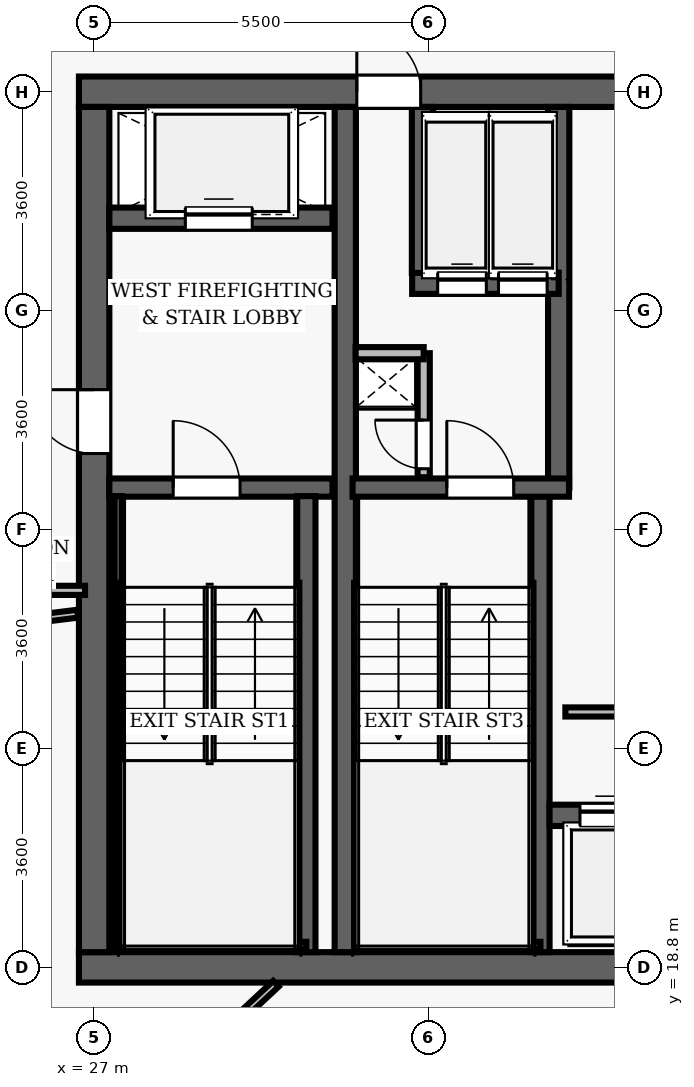
"""IFC4 building model, lengths in metres.
Left out: names, types, materials, properties, quantities, classifications, styles, units other than length and angle.
Written with IfcOpenShell. Run it as: python <this file> out.ifc"""

import sys

from ifc_helpers import new_model, si_unit, direction, frame, frame_2d, origin, place, context, subcontext, project, spatial, rectangle, extrude, element, fill, save


model = new_model("IFC4")
c1 = context("Model", 3, precision=1e-05, world=origin(), true_north=direction((0.0, 1.0)))
c2 = subcontext(c1, "Body", "Model", "MODEL_VIEW")
j1 = project(units=[si_unit("LENGTHUNIT", "METRE"), si_unit("PLANEANGLEUNIT", "RADIAN")], contexts=[c1])
p1 = place(None, origin())
s1 = spatial("IfcSite", under=j1, at=p1, CompositionType="ELEMENT")
p2 = place(p1, origin())
s2 = spatial("IfcBuilding", under=s1, at=p2, CompositionType="ELEMENT")
p3 = place(p2, frame((0.0, 0.0, 209.7)))
s3 = spatial("IfcBuildingStorey", under=s2, at=p3, CompositionType="ELEMENT", Elevation=209.7)
p4 = place(p3, frame((26.75, 18.8, 0.0), z_axis=(0.0, 0.0, 1.0), x_axis=(1.0, 0.0, 0.0)))
e1 = element("IfcWall", 1, at=p4, inside=s3, PredefinedType="SHEAR", context=c2, shape_type="SweptSolid", body=[
    extrude(rectangle(XDim=22.5, YDim=0.5, at=frame_2d((11.25, 0.0))), origin(), (0.0, 0.0, 1.0), 3.85),
])
p5 = place(p4, frame((14.47, 0.0, 0.0)))
e2 = element("IfcOpeningElement", 2, at=p5, cuts=e1, PredefinedType="OPENING", context=c2, shape_type="SweptSolid", body=[
    extrude(rectangle(XDim=1.05, YDim=2.15, at=frame_2d((0.525, 1.075))), frame((0.0, 0.26, 0.0), z_axis=(0.0, -1.0, 0.0), x_axis=(1.0, 0.0, 0.0)), (0.0, 0.0, 1.0), 0.52),
])
p6 = place(p3, frame((26.75, 33.2, 0.0), z_axis=(0.0, 0.0, 1.0), x_axis=(1.0, 0.0, 0.0)))
e3 = element("IfcWall", 3, at=p6, inside=s3, PredefinedType="SHEAR", context=c2, shape_type="SweptSolid", body=[
    extrude(rectangle(XDim=22.5, YDim=0.5, at=frame_2d((11.25, 0.0))), origin(), (0.0, 0.0, 1.0), 3.85),
])
p7 = place(p6, frame((4.57, 0.0, 0.0)))
e4 = element("IfcOpeningElement", 4, at=p7, cuts=e3, PredefinedType="OPENING", context=c2, shape_type="SweptSolid", body=[
    extrude(rectangle(XDim=1.05, YDim=2.15, at=frame_2d((0.525, 1.075))), frame((0.0, 0.26, 0.0), z_axis=(0.0, -1.0, 0.0), x_axis=(1.0, 0.0, 0.0)), (0.0, 0.0, 1.0), 0.52),
])
p8 = place(p6, frame((14.47, 0.0, 0.0)))
e5 = element("IfcOpeningElement", 5, at=p8, cuts=e3, PredefinedType="OPENING", context=c2, shape_type="SweptSolid", body=[
    extrude(rectangle(XDim=1.05, YDim=2.15, at=frame_2d((0.525, 1.075))), frame((0.0, 0.26, 0.0), z_axis=(0.0, -1.0, 0.0), x_axis=(1.0, 0.0, 0.0)), (0.0, 0.0, 1.0), 0.52),
])
p9 = place(p3, frame((27.0, 19.05, 0.0), z_axis=(0.0, 0.0, 1.0), x_axis=(0.0, 1.0, 0.0)))
e6 = element("IfcWall", 6, at=p9, inside=s3, PredefinedType="SHEAR", context=c2, shape_type="SweptSolid", body=[
    extrude(rectangle(XDim=13.9, YDim=0.5, at=frame_2d((6.95, 0.0))), origin(), (0.0, 0.0, 1.0), 3.85),
])
p10 = place(p9, frame((8.2, 0.0, 0.0)))
e7 = element("IfcOpeningElement", 7, at=p10, cuts=e6, PredefinedType="OPENING", context=c2, shape_type="SweptSolid", body=[
    extrude(rectangle(XDim=1.05, YDim=2.15, at=frame_2d((0.525, 1.075))), frame((0.0, 0.26, 0.0), z_axis=(0.0, -1.0, 0.0), x_axis=(1.0, 0.0, 0.0)), (0.0, 0.0, 1.0), 0.52),
])
p11 = place(p3, frame((31.13, 19.05, 0.0), z_axis=(0.0, 0.0, 1.0), x_axis=(0.0, 1.0, 0.0)))
e8 = element("IfcWall", 8, at=p11, inside=s3, PredefinedType="SHEAR", context=c2, shape_type="SweptSolid", body=[
    extrude(rectangle(XDim=13.9, YDim=0.35, at=frame_2d((6.95, 0.0))), origin(), (0.0, 0.0, 1.0), 3.85),
])
p12 = place(p3, frame((27.25, 26.69, 0.0), z_axis=(0.0, 0.0, 1.0), x_axis=(1.0, 0.0, 0.0)))
e9 = element("IfcWall", 9, at=p12, inside=s3, PredefinedType="SHEAR", context=c2, shape_type="SweptSolid", body=[
    extrude(rectangle(XDim=3.67, YDim=0.3, at=frame_2d((1.835, 0.0))), origin(), (0.0, 0.0, 1.0), 3.85),
])
p13 = place(p12, frame((1.05, 0.0, 0.0)))
e10 = element("IfcOpeningElement", 10, at=p13, cuts=e9, PredefinedType="OPENING", context=c2, shape_type="SweptSolid", body=[
    extrude(rectangle(XDim=1.1, YDim=2.15, at=frame_2d((0.55, 1.075))), frame((0.0, 0.16, 0.0), z_axis=(0.0, -1.0, 0.0), x_axis=(1.0, 0.0, 0.0)), (0.0, 0.0, 1.0), 0.32),
])
p14 = place(p3, frame((30.49, 19.05, 0.0), z_axis=(0.0, 0.0, 1.0), x_axis=(0.0, 1.0, 0.0)))
e11 = element("IfcWall", 11, at=p14, inside=s3, PredefinedType="SHEAR", context=c2, shape_type="SweptSolid", body=[
    extrude(rectangle(XDim=7.5, YDim=0.3, at=frame_2d((3.75, 0.0))), origin(), (0.0, 0.0, 1.0), 3.85),
])
p15 = place(p3, frame((27.395, 19.1, 0.0), z_axis=(0.0, 0.0, 1.0), x_axis=(0.0, 1.0, 0.0)))
e12 = element("IfcWall", 12, at=p15, inside=s3, PredefinedType="SHEAR", context=c2, shape_type="SweptSolid", body=[
    extrude(rectangle(XDim=7.45, YDim=0.12, at=frame_2d((3.725, 0.0))), origin(), (0.0, 0.0, 1.0), 3.85),
])
p16 = place(p3, frame((27.395, 19.16, 0.0), z_axis=(0.0, 0.0, 1.0), x_axis=(1.0, 0.0, 0.0)))
e13 = element("IfcWall", 13, at=p16, inside=s3, PredefinedType="SHEAR", context=c2, shape_type="SweptSolid", body=[
    extrude(rectangle(XDim=3.095, YDim=0.12, at=frame_2d((1.547, 0.0))), origin(), (0.0, 0.0, 1.0), 3.85),
])
p17 = place(p3, frame((27.25, 31.12, 0.0), z_axis=(0.0, 0.0, 1.0), x_axis=(1.0, 0.0, 0.0)))
e14 = element("IfcWall", 14, at=p17, inside=s3, PredefinedType="SHEAR", context=c2, shape_type="SweptSolid", body=[
    extrude(rectangle(XDim=3.67, YDim=0.35, at=frame_2d((1.835, 0.0))), origin(), (0.0, 0.0, 1.0), 3.035),
])
p18 = place(p17, frame((1.25, 0.0, 0.0)))
e15 = element("IfcOpeningElement", 15, at=p18, cuts=e14, PredefinedType="OPENING", context=c2, shape_type="SweptSolid", body=[
    extrude(rectangle(XDim=1.1, YDim=2.15, at=frame_2d((0.55, 1.075))), frame((0.0, 0.185, 0.0), z_axis=(0.0, -1.0, 0.0), x_axis=(1.0, 0.0, 0.0)), (0.0, 0.0, 1.0), 0.37),
])
p19 = place(p3, frame((34.34, 19.05, 0.0), z_axis=(0.0, 0.0, 1.0), x_axis=(0.0, 1.0, 0.0)))
e16 = element("IfcWall", 16, at=p19, inside=s3, PredefinedType="SHEAR", context=c2, shape_type="SweptSolid", body=[
    extrude(rectangle(XDim=7.5, YDim=0.3, at=frame_2d((3.75, 0.0))), origin(), (0.0, 0.0, 1.0), 3.85),
])
p20 = place(p3, frame((34.64, 26.69, 0.0), z_axis=(0.0, 0.0, 1.0), x_axis=(0.0, 1.0, 0.0)))
e17 = element("IfcWall", 17, at=p20, inside=s3, PredefinedType="SHEAR", context=c2, shape_type="SweptSolid", body=[
    extrude(rectangle(XDim=6.26, YDim=0.35, at=frame_2d((3.13, 0.0))), origin(), (0.0, 0.0, 1.0), 3.85),
])
p21 = place(p3, frame((31.25, 26.69, 0.0), z_axis=(0.0, 0.0, 1.0), x_axis=(1.0, 0.0, 0.0)))
e18 = element("IfcWall", 18, at=p21, inside=s3, PredefinedType="SHEAR", context=c2, shape_type="SweptSolid", body=[
    extrude(rectangle(XDim=3.56, YDim=0.3, at=frame_2d((1.78, 0.0))), origin(), (0.0, 0.0, 1.0), 3.85),
])
p22 = place(p21, frame((1.55, 0.0, 0.0)))
e19 = element("IfcOpeningElement", 19, at=p22, cuts=e18, PredefinedType="OPENING", context=c2, shape_type="SweptSolid", body=[
    extrude(rectangle(XDim=1.1, YDim=2.15, at=frame_2d((0.55, 1.075))), frame((0.0, 0.16, 0.0), z_axis=(0.0, -1.0, 0.0), x_axis=(1.0, 0.0, 0.0)), (0.0, 0.0, 1.0), 0.32),
])
p23 = place(p3, frame((31.3, 19.16, 0.0), z_axis=(0.0, 0.0, 1.0), x_axis=(1.0, 0.0, 0.0)))
e20 = element("IfcWall", 20, at=p23, inside=s3, PredefinedType="SHEAR", context=c2, shape_type="SweptSolid", body=[
    extrude(rectangle(XDim=3.04, YDim=0.12, at=frame_2d((1.52, 0.0))), origin(), (0.0, 0.0, 1.0), 3.85),
])
p24 = place(p3, frame((32.23, 30.05, 0.0), z_axis=(0.0, 0.0, 1.0), x_axis=(1.0, 0.0, 0.0)))
e21 = element("IfcWall", 21, at=p24, inside=s3, PredefinedType="SHEAR", context=c2, shape_type="SweptSolid", body=[
    extrude(rectangle(XDim=2.41, YDim=0.35, at=frame_2d((1.205, 0.0))), origin(), (0.0, 0.0, 1.0), 3.035),
])
p25 = place(p24, frame((0.42, 0.0, 0.0)))
e22 = element("IfcOpeningElement", 22, at=p25, cuts=e21, PredefinedType="OPENING", context=c2, shape_type="SweptSolid", body=[
    extrude(rectangle(XDim=0.8, YDim=2.15, at=frame_2d((0.4, 1.075))), frame((0.0, 0.185, 0.0), z_axis=(0.0, -1.0, 0.0), x_axis=(1.0, 0.0, 0.0)), (0.0, 0.0, 1.0), 0.37),
])
p26 = place(p24, frame((1.42, 0.0, 0.0)))
e23 = element("IfcOpeningElement", 23, at=p26, cuts=e21, PredefinedType="OPENING", context=c2, shape_type="SweptSolid", body=[
    extrude(rectangle(XDim=0.8, YDim=2.15, at=frame_2d((0.4, 1.075))), frame((0.0, 0.185, 0.0), z_axis=(0.0, -1.0, 0.0), x_axis=(1.0, 0.0, 0.0)), (0.0, 0.0, 1.0), 0.37),
])
p27 = place(p3, frame((32.4, 30.22, 0.0), z_axis=(0.0, 0.0, 1.0), x_axis=(0.0, 1.0, 0.0)))
e24 = element("IfcWall", 24, at=p27, inside=s3, PredefinedType="SHEAR", context=c2, shape_type="SweptSolid", body=[
    extrude(rectangle(XDim=2.73, YDim=0.35, at=frame_2d((1.365, 0.0))), origin(), (0.0, 0.0, 1.0), 3.035),
])
p28 = place(p3, frame((32.42, 26.86, 0.0), z_axis=(0.0, 0.0, 1.0), x_axis=(0.0, 1.0, 0.0)))
e25 = element("IfcWall", 25, at=p28, inside=s3, PredefinedType="PARTITIONING", context=c2, shape_type="SweptSolid", body=[
    extrude(rectangle(XDim=2.04, YDim=0.2, at=frame_2d((1.02, 0.0))), origin(), (0.0, 0.0, 1.0), 3.035),
])
p29 = place(p28, frame((0.14, 0.0, 0.0)))
e26 = element("IfcOpeningElement", 26, at=p29, cuts=e25, PredefinedType="OPENING", context=c2, shape_type="SweptSolid", body=[
    extrude(rectangle(XDim=0.8, YDim=2.05, at=frame_2d((0.4, 1.025))), frame((0.0, 0.11, 0.0), z_axis=(0.0, -1.0, 0.0), x_axis=(1.0, 0.0, 0.0)), (0.0, 0.0, 1.0), 0.22),
])
p30 = place(p3, frame((31.3, 28.9, 0.0), z_axis=(0.0, 0.0, 1.0), x_axis=(1.0, 0.0, 0.0)))
e27 = element("IfcWall", 27, at=p30, inside=s3, PredefinedType="PARTITIONING", context=c2, shape_type="SweptSolid", body=[
    extrude(rectangle(XDim=1.12, YDim=0.2, at=frame_2d((0.56, 0.0))), origin(), (0.0, 0.0, 1.0), 3.035),
])
p31 = place(p3, frame((34.49, 21.3, 0.0), z_axis=(0.0, 0.0, 1.0), x_axis=(1.0, 0.0, 0.0)))
e28 = element("IfcWall", 28, at=p31, inside=s3, PredefinedType="SHEAR", context=c2, shape_type="SweptSolid", body=[
    extrude(rectangle(XDim=6.68, YDim=0.35, at=frame_2d((3.34, 0.0))), origin(), (0.0, 0.0, 1.0), 3.035),
])
p32 = place(p31, frame((0.5, 0.0, 0.0)))
e29 = element("IfcOpeningElement", 29, at=p32, cuts=e28, PredefinedType="OPENING", context=c2, shape_type="SweptSolid", body=[
    extrude(rectangle(XDim=0.9, YDim=2.15, at=frame_2d((0.45, 1.075))), frame((0.0, 0.185, 0.0), z_axis=(0.0, -1.0, 0.0), x_axis=(1.0, 0.0, 0.0)), (0.0, 0.0, 1.0), 0.37),
])
p33 = place(p31, frame((2.58, 0.0, 0.0)))
e30 = element("IfcOpeningElement", 30, at=p33, cuts=e28, PredefinedType="OPENING", context=c2, shape_type="SweptSolid", body=[
    extrude(rectangle(XDim=0.9, YDim=2.15, at=frame_2d((0.45, 1.075))), frame((0.0, 0.185, 0.0), z_axis=(0.0, -1.0, 0.0), x_axis=(1.0, 0.0, 0.0)), (0.0, 0.0, 1.0), 0.37),
])
p34 = place(p31, frame((4.66, 0.0, 0.0)))
e31 = element("IfcOpeningElement", 31, at=p34, cuts=e28, PredefinedType="OPENING", context=c2, shape_type="SweptSolid", body=[
    extrude(rectangle(XDim=0.9, YDim=2.15, at=frame_2d((0.45, 1.075))), frame((0.0, 0.185, 0.0), z_axis=(0.0, -1.0, 0.0), x_axis=(1.0, 0.0, 0.0)), (0.0, 0.0, 1.0), 0.37),
])
p35 = place(p3, frame((34.75, 23.0, 0.0), z_axis=(0.0, 0.0, 1.0), x_axis=(1.0, 0.0, 0.0)))
e32 = element("IfcWall", 32, at=p35, inside=s3, PredefinedType="PARTITIONING", context=c2, shape_type="SweptSolid", body=[
    extrude(rectangle(XDim=6.25, YDim=0.15, at=frame_2d((3.125, 0.0))), origin(), (0.0, 0.0, 1.0), 3.035),
])
p36 = place(p3, frame((16.438, 25.0, 0.0), z_axis=(0.0, 0.0, 1.0), x_axis=(1.0, 0.0, 0.0)))
e33 = element("IfcWall", 33, at=p36, inside=s3, PredefinedType="PARTITIONING", context=c2, shape_type="SweptSolid", body=[
    extrude(rectangle(XDim=10.412, YDim=0.15, at=frame_2d((5.206, 0.0))), origin(), (0.0, 0.0, 1.0), 3.035),
])
p37 = place(p3, frame((26.73, 24.616, 0.0), z_axis=(0.0, 0.0, 1.0), x_axis=(-0.99254566269, -0.12187332553, 0.0)))
e34 = element("IfcWall", 34, at=p37, inside=s3, PredefinedType="PARTITIONING", context=c2, shape_type="SweptSolid", body=[
    extrude(rectangle(XDim=11.971, YDim=0.13, at=frame_2d((5.986, 0.0))), origin(), (0.0, 0.0, 1.0), 3.035),
])
p38 = place(p3, frame((29.99, 18.53, 0.0), z_axis=(0.0, 0.0, 1.0), x_axis=(-0.731353925915, -0.681998119535, 0.0)))
e35 = element("IfcWall", 35, at=p38, inside=s3, PredefinedType="PARTITIONING", context=c2, shape_type="SweptSolid", body=[
    extrude(rectangle(XDim=9.458, YDim=0.13, at=frame_2d((4.729, 0.0))), origin(), (0.0, 0.0, 1.0), 3.035),
])
p39 = place(p3, frame((36.548, 18.53, 0.0), z_axis=(0.0, 0.0, 1.0), x_axis=(-0.190821746149, -0.981624704863, 0.0)))
e36 = element("IfcWall", 36, at=p39, inside=s3, PredefinedType="PARTITIONING", context=c2, shape_type="SweptSolid", body=[
    extrude(rectangle(XDim=14.321, YDim=0.13, at=frame_2d((7.16, 0.0))), origin(), (0.0, 0.0, 1.0), 3.035),
])
p40 = place(p13, origin())
e37 = element("IfcDoor", 37, at=p40, inside=s3, OperationType="SINGLE_SWING_LEFT", PredefinedType="DOOR", context=c2, shape_type="SweptSolid", body=[
    extrude(rectangle(XDim=1.1, YDim=2.15, at=frame_2d((0.55, 1.075))), frame((0.0, 0.025, 0.0), z_axis=(0.0, -1.0, 0.0), x_axis=(1.0, 0.0, 0.0)), (0.0, 0.0, 1.0), 0.05),
])
fill(e10, e37)
p41 = place(p10, origin())
e38 = element("IfcDoor", 38, at=p41, inside=s3, OperationType="SINGLE_SWING_RIGHT", PredefinedType="DOOR", context=c2, shape_type="SweptSolid", body=[
    extrude(rectangle(XDim=1.05, YDim=2.15, at=frame_2d((0.525, 1.075))), frame((0.0, 0.025, 0.0), z_axis=(0.0, -1.0, 0.0), x_axis=(1.0, 0.0, 0.0)), (0.0, 0.0, 1.0), 0.05),
])
fill(e7, e38)
p42 = place(p22, origin())
e39 = element("IfcDoor", 39, at=p42, inside=s3, OperationType="SINGLE_SWING_LEFT", PredefinedType="DOOR", context=c2, shape_type="SweptSolid", body=[
    extrude(rectangle(XDim=1.1, YDim=2.15, at=frame_2d((0.55, 1.075))), frame((0.0, 0.025, 0.0), z_axis=(0.0, -1.0, 0.0), x_axis=(1.0, 0.0, 0.0)), (0.0, 0.0, 1.0), 0.05),
])
fill(e19, e39)
p43 = place(p29, origin())
e40 = element("IfcDoor", 40, at=p43, inside=s3, OperationType="SINGLE_SWING_RIGHT", PredefinedType="DOOR", context=c2, shape_type="SweptSolid", body=[
    extrude(rectangle(XDim=0.8, YDim=2.05, at=frame_2d((0.4, 1.025))), frame((0.0, 0.025, 0.0), z_axis=(0.0, -1.0, 0.0), x_axis=(1.0, 0.0, 0.0)), (0.0, 0.0, 1.0), 0.05),
])
fill(e26, e40)
p44 = place(p7, origin())
e41 = element("IfcDoor", 41, at=p44, inside=s3, OperationType="SINGLE_SWING_LEFT", PredefinedType="DOOR", context=c2, shape_type="SweptSolid", body=[
    extrude(rectangle(XDim=1.05, YDim=2.15, at=frame_2d((0.525, 1.075))), frame((0.0, 0.025, 0.0), z_axis=(0.0, -1.0, 0.0), x_axis=(1.0, 0.0, 0.0)), (0.0, 0.0, 1.0), 0.05),
])
fill(e4, e41)
p45 = place(p32, origin())
e42 = element("IfcDoor", 42, at=p45, inside=s3, OperationType="SLIDING_TO_LEFT", PredefinedType="DOOR", context=c2, shape_type="SweptSolid", body=[
    extrude(rectangle(XDim=0.9, YDim=2.15, at=frame_2d((0.45, 1.075))), frame((0.0, 0.025, 0.0), z_axis=(0.0, -1.0, 0.0), x_axis=(1.0, 0.0, 0.0)), (0.0, 0.0, 1.0), 0.05),
])
fill(e29, e42)
p46 = place(p18, origin())
e43 = element("IfcDoor", 43, at=p46, inside=s3, OperationType="SLIDING_TO_LEFT", PredefinedType="DOOR", context=c2, shape_type="SweptSolid", body=[
    extrude(rectangle(XDim=1.1, YDim=2.15, at=frame_2d((0.55, 1.075))), frame((0.0, 0.025, 0.0), z_axis=(0.0, -1.0, 0.0), x_axis=(1.0, 0.0, 0.0)), (0.0, 0.0, 1.0), 0.05),
])
fill(e15, e43)
p47 = place(p25, origin())
e44 = element("IfcDoor", 44, at=p47, inside=s3, OperationType="SLIDING_TO_LEFT", PredefinedType="DOOR", context=c2, shape_type="SweptSolid", body=[
    extrude(rectangle(XDim=0.8, YDim=2.15, at=frame_2d((0.4, 1.075))), frame((0.0, 0.025, 0.0), z_axis=(0.0, -1.0, 0.0), x_axis=(1.0, 0.0, 0.0)), (0.0, 0.0, 1.0), 0.05),
])
fill(e22, e44)
p48 = place(p26, origin())
e45 = element("IfcDoor", 45, at=p48, inside=s3, OperationType="SLIDING_TO_LEFT", PredefinedType="DOOR", context=c2, shape_type="SweptSolid", body=[
    extrude(rectangle(XDim=0.8, YDim=2.15, at=frame_2d((0.4, 1.075))), frame((0.0, 0.025, 0.0), z_axis=(0.0, -1.0, 0.0), x_axis=(1.0, 0.0, 0.0)), (0.0, 0.0, 1.0), 0.05),
])
fill(e23, e45)
save(model, sys.argv[1])
